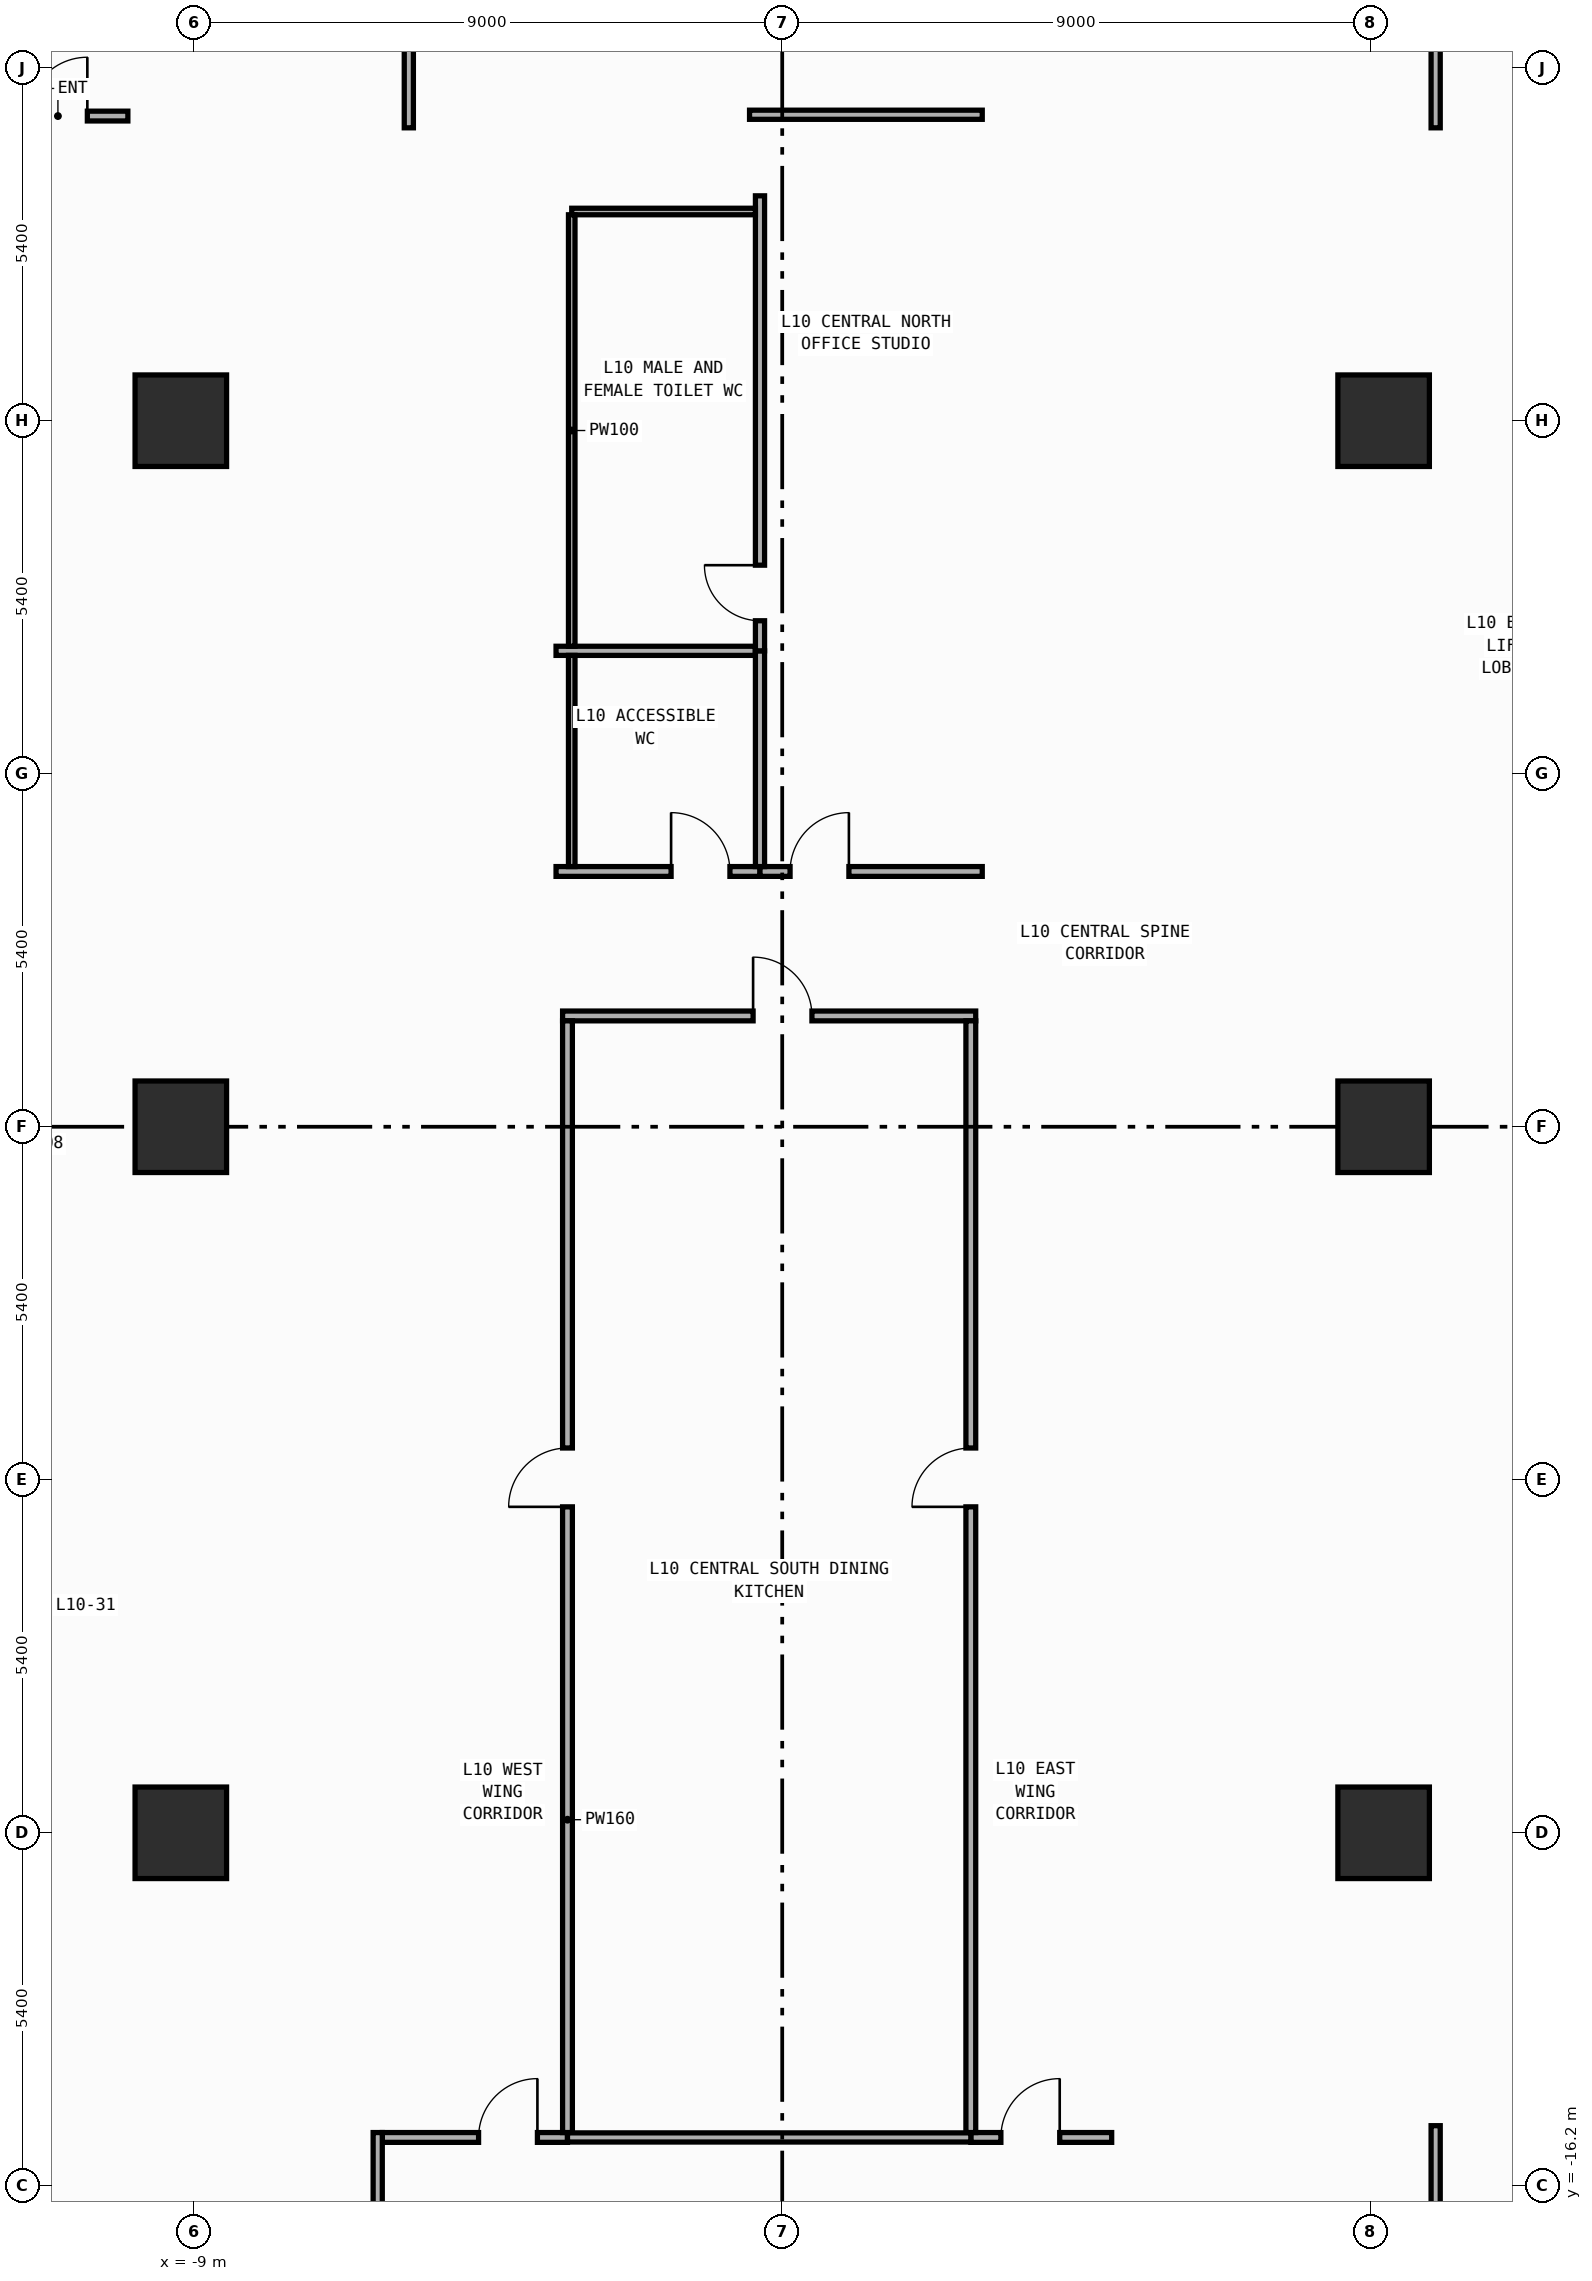
"""IFC4 building model, lengths in metres.
Left out: names, types, materials, properties, quantities, classifications, styles, units other than length and angle.
Written with IfcOpenShell. Run it as: python <this file> out.ifc"""

import sys

from ifc_helpers import new_model, si_unit, direction, frame, frame_2d, origin, origin_2d, place, context, subcontext, project, spatial, rectangle, extrude, element, fill, save


model = new_model("IFC4")
c1 = context("Model", 3, precision=1e-05, world=origin(), true_north=direction((0.0, 1.0)))
c2 = subcontext(c1, "Body", "Model", "MODEL_VIEW")
j1 = project(units=[si_unit("LENGTHUNIT", "METRE"), si_unit("PLANEANGLEUNIT", "RADIAN")], contexts=[c1])
p1 = place(None, origin())
s1 = spatial("IfcSite", under=j1, at=p1, CompositionType="ELEMENT")
p2 = place(p1, origin())
s2 = spatial("IfcBuilding", under=s1, at=p2, CompositionType="ELEMENT")
p3 = place(p2, frame((0.0, 0.0, 42.8)))
s3 = spatial("IfcBuildingStorey", under=s2, at=p3, CompositionType="ELEMENT", Elevation=42.8)
for number, where, z_axis, x_axis in (
    (1, (-9.2, -10.8, 0.0), (0.0, 0.0, 1.0), (1.0, 0.0, 0.0)),
    (2, (-9.2, 0.0, 0.0), (0.0, 0.0, 1.0), (1.0, 0.0, 0.0)),
    (3, (-9.2, 10.8, 0.0), (0.0, 0.0, 1.0), (1.0, 0.0, 0.0)),
    (4, (9.2, -10.8, 0.0), (0.0, 0.0, 1.0), (1.0, 0.0, 0.0)),
    (5, (9.2, 0.0, 0.0), (0.0, 0.0, 1.0), (1.0, 0.0, 0.0)),
    (6, (9.2, 10.8, 0.0), (0.0, 0.0, 1.0), (1.0, 0.0, 0.0)),
):
    element("IfcColumn", number, at=place(p3, frame(where, z_axis=z_axis, x_axis=x_axis)), inside=s3, PredefinedType="COLUMN", context=c2, shape_type="SweptSolid", body=[
        extrude(rectangle(XDim=1.4, YDim=1.4, at=origin_2d()), origin(), (0.0, 0.0, 1.0), 4.2),
    ])
p4 = place(p3, frame((-11.99, 15.46, 0.0), z_axis=(0.0, 0.0, 1.0), x_axis=(1.0, 0.0, 0.0)))
e7 = element("IfcWall", 7, at=p4, inside=s3, PredefinedType="PARTITIONING", context=c2, shape_type="SweptSolid", body=[
    extrude(rectangle(XDim=1.98, YDim=0.15, at=frame_2d((0.99, 0.0))), origin(), (0.0, 0.0, 1.0), 3.94),
])
p5 = place(p4, frame((0.46, 0.0, 0.0)))
e8 = element("IfcOpeningElement", 8, at=p5, cuts=e7, PredefinedType="OPENING", context=c2, shape_type="SweptSolid", body=[
    extrude(rectangle(XDim=0.9, YDim=2.15, at=frame_2d((0.45, 1.075))), frame((0.0, 0.085, 0.0), z_axis=(0.0, -1.0, 0.0), x_axis=(1.0, 0.0, 0.0)), (0.0, 0.0, 1.0), 0.17),
])
p6 = place(p3, frame((-3.46, 3.905, 0.0), z_axis=(0.0, 0.0, 1.0), x_axis=(1.0, 0.0, 0.0)))
e9 = element("IfcWall", 9, at=p6, inside=s3, PredefinedType="PARTITIONING", context=c2, shape_type="SweptSolid", body=[
    extrude(rectangle(XDim=3.12, YDim=0.15, at=frame_2d((1.56, 0.0))), origin(), (0.0, 0.0, 1.0), 3.94),
])
p7 = place(p6, frame((1.76, 0.0, 0.0)))
e10 = element("IfcOpeningElement", 10, at=p7, cuts=e9, PredefinedType="OPENING", context=c2, shape_type="SweptSolid", body=[
    extrude(rectangle(XDim=0.9, YDim=2.15, at=frame_2d((0.45, 1.075))), frame((0.0, 0.085, 0.0), z_axis=(0.0, -1.0, 0.0), x_axis=(1.0, 0.0, 0.0)), (0.0, 0.0, 1.0), 0.17),
])
p8 = place(p3, frame((-0.34, 3.905, 0.0), z_axis=(0.0, 0.0, 1.0), x_axis=(1.0, 0.0, 0.0)))
e11 = element("IfcWall", 11, at=p8, inside=s3, PredefinedType="PARTITIONING", context=c2, shape_type="SweptSolid", body=[
    extrude(rectangle(XDim=3.4, YDim=0.15, at=frame_2d((1.7, 0.0))), origin(), (0.0, 0.0, 1.0), 3.94),
])
p9 = place(p8, frame((0.46, 0.0, 0.0)))
e12 = element("IfcOpeningElement", 12, at=p9, cuts=e11, PredefinedType="OPENING", context=c2, shape_type="SweptSolid", body=[
    extrude(rectangle(XDim=0.9, YDim=2.15, at=frame_2d((0.45, 1.075))), frame((0.0, 0.085, 0.0), z_axis=(0.0, -1.0, 0.0), x_axis=(1.0, 0.0, 0.0)), (0.0, 0.0, 1.0), 0.17),
])
p10 = place(p3, frame((-3.36, 1.695, 0.0), z_axis=(0.0, 0.0, 1.0), x_axis=(1.0, 0.0, 0.0)))
e13 = element("IfcWall", 13, at=p10, inside=s3, PredefinedType="PARTITIONING", context=c2, shape_type="SweptSolid", body=[
    extrude(rectangle(XDim=6.32, YDim=0.15, at=frame_2d((3.16, 0.0))), origin(), (0.0, 0.0, 1.0), 3.94),
])
p11 = place(p10, frame((2.915, 0.0, 0.0)))
e14 = element("IfcOpeningElement", 14, at=p11, cuts=e13, PredefinedType="OPENING", context=c2, shape_type="SweptSolid", body=[
    extrude(rectangle(XDim=0.9, YDim=2.15, at=frame_2d((0.45, 1.075))), frame((0.0, 0.085, 0.0), z_axis=(0.0, -1.0, 0.0), x_axis=(1.0, 0.0, 0.0)), (0.0, 0.0, 1.0), 0.17),
])
p12 = place(p3, frame((-6.118, -15.46, 0.0), z_axis=(0.0, 0.0, 1.0), x_axis=(1.0, 0.0, 0.0)))
e15 = element("IfcWall", 15, at=p12, inside=s3, PredefinedType="PARTITIONING", context=c2, shape_type="SweptSolid", body=[
    extrude(rectangle(XDim=2.833, YDim=0.15, at=frame_2d((1.417, 0.0))), origin(), (0.0, 0.0, 1.0), 3.94),
])
p13 = place(p12, frame((1.473, 0.0, 0.0)))
e16 = element("IfcOpeningElement", 16, at=p13, cuts=e15, PredefinedType="OPENING", context=c2, shape_type="SweptSolid", body=[
    extrude(rectangle(XDim=0.9, YDim=2.15, at=frame_2d((0.45, 1.075))), frame((0.0, 0.085, 0.0), z_axis=(0.0, -1.0, 0.0), x_axis=(1.0, 0.0, 0.0)), (0.0, 0.0, 1.0), 0.17),
])
p14 = place(p3, frame((-3.285, -15.385, 0.0), z_axis=(0.0, 0.0, 1.0), x_axis=(0.0, 1.0, 0.0)))
e17 = element("IfcWall", 17, at=p14, inside=s3, PredefinedType="PARTITIONING", context=c2, shape_type="SweptSolid", body=[
    extrude(rectangle(XDim=17.005, YDim=0.15, at=frame_2d((8.502, 0.0))), origin(), (0.0, 0.0, 1.0), 3.94),
])
p15 = place(p14, frame((9.571, 0.0, 0.0)))
e18 = element("IfcOpeningElement", 18, at=p15, cuts=e17, PredefinedType="OPENING", context=c2, shape_type="SweptSolid", body=[
    extrude(rectangle(XDim=0.9, YDim=2.15, at=frame_2d((0.45, 1.075))), frame((0.0, 0.085, 0.0), z_axis=(0.0, -1.0, 0.0), x_axis=(1.0, 0.0, 0.0)), (0.0, 0.0, 1.0), 0.17),
])
p16 = place(p3, frame((2.885, -15.46, 0.0), z_axis=(0.0, 0.0, 1.0), x_axis=(1.0, 0.0, 0.0)))
e19 = element("IfcWall", 19, at=p16, inside=s3, PredefinedType="PARTITIONING", context=c2, shape_type="SweptSolid", body=[
    extrude(rectangle(XDim=2.155, YDim=0.15, at=frame_2d((1.078, 0.0))), origin(), (0.0, 0.0, 1.0), 3.94),
])
p17 = place(p16, frame((0.46, 0.0, 0.0)))
e20 = element("IfcOpeningElement", 20, at=p17, cuts=e19, PredefinedType="OPENING", context=c2, shape_type="SweptSolid", body=[
    extrude(rectangle(XDim=0.9, YDim=2.15, at=frame_2d((0.45, 1.075))), frame((0.0, 0.085, 0.0), z_axis=(0.0, -1.0, 0.0), x_axis=(1.0, 0.0, 0.0)), (0.0, 0.0, 1.0), 0.17),
])
p18 = place(p3, frame((2.885, -15.385, 0.0), z_axis=(0.0, 0.0, 1.0), x_axis=(0.0, 1.0, 0.0)))
e21 = element("IfcWall", 21, at=p18, inside=s3, PredefinedType="PARTITIONING", context=c2, shape_type="SweptSolid", body=[
    extrude(rectangle(XDim=17.005, YDim=0.15, at=frame_2d((8.502, 0.0))), origin(), (0.0, 0.0, 1.0), 3.94),
])
p19 = place(p18, frame((9.571, 0.0, 0.0)))
e22 = element("IfcOpeningElement", 22, at=p19, cuts=e21, PredefinedType="OPENING", context=c2, shape_type="SweptSolid", body=[
    extrude(rectangle(XDim=0.9, YDim=2.15, at=frame_2d((0.45, 1.075))), frame((0.0, 0.085, 0.0), z_axis=(0.0, -1.0, 0.0), x_axis=(1.0, 0.0, 0.0)), (0.0, 0.0, 1.0), 0.17),
])
p20 = place(p3, frame((-5.712, 15.28, 0.0), z_axis=(0.0, 0.0, 1.0), x_axis=(0.0, 1.0, 0.0)))
e23 = element("IfcWall", 23, at=p20, inside=s3, PredefinedType="PARTITIONING", context=c2, shape_type="SweptSolid", body=[
    extrude(rectangle(XDim=11.575, YDim=0.14, at=frame_2d((5.788, 0.0))), origin(), (0.0, 0.0, 1.0), 3.94),
])
p21 = place(p20, frame((10.265, 0.0, 0.0)))
e24 = element("IfcOpeningElement", 24, at=p21, cuts=e23, PredefinedType="OPENING", context=c2, shape_type="SweptSolid", body=[
    extrude(rectangle(XDim=0.85, YDim=2.1, at=frame_2d((0.425, 1.05))), frame((0.0, 0.08, 0.0), z_axis=(0.0, -1.0, 0.0), x_axis=(1.0, 0.0, 0.0)), (0.0, 0.0, 1.0), 0.16),
])
p22 = place(p3, frame((9.996, 15.28, 0.0), z_axis=(0.0, 0.0, 1.0), x_axis=(0.0, 1.0, 0.0)))
e25 = element("IfcWall", 25, at=p22, inside=s3, PredefinedType="PARTITIONING", context=c2, shape_type="SweptSolid", body=[
    extrude(rectangle(XDim=11.575, YDim=0.14, at=frame_2d((5.788, 0.0))), origin(), (0.0, 0.0, 1.0), 3.94),
])
p23 = place(p3, frame((-0.5, 15.48, 0.0), z_axis=(0.0, 0.0, 1.0), x_axis=(1.0, 0.0, 0.0)))
e26 = element("IfcWall", 26, at=p23, inside=s3, PredefinedType="PARTITIONING", context=c2, shape_type="SweptSolid", body=[
    extrude(rectangle(XDim=3.56, YDim=0.14, at=frame_2d((1.78, 0.0))), origin(), (0.0, 0.0, 1.0), 3.94),
])
p24 = place(p3, frame((-6.188, -26.795, 0.0), z_axis=(0.0, 0.0, 1.0), x_axis=(0.0, 1.0, 0.0)))
e27 = element("IfcWall", 27, at=p24, inside=s3, PredefinedType="PARTITIONING", context=c2, shape_type="SweptSolid", body=[
    extrude(rectangle(XDim=11.41, YDim=0.14, at=frame_2d((5.705, 0.0))), origin(), (0.0, 0.0, 1.0), 3.94),
])
p25 = place(p24, frame((0.46, 0.0, 0.0)))
e28 = element("IfcOpeningElement", 28, at=p25, cuts=e27, PredefinedType="OPENING", context=c2, shape_type="SweptSolid", body=[
    extrude(rectangle(XDim=0.85, YDim=2.1, at=frame_2d((0.425, 1.05))), frame((0.0, 0.08, 0.0), z_axis=(0.0, -1.0, 0.0), x_axis=(1.0, 0.0, 0.0)), (0.0, 0.0, 1.0), 0.16),
])
p26 = place(p3, frame((9.996, -26.716, 0.0), z_axis=(0.0, 0.0, 1.0), x_axis=(0.0, 1.0, 0.0)))
e29 = element("IfcWall", 29, at=p26, inside=s3, PredefinedType="PARTITIONING", context=c2, shape_type="SweptSolid", body=[
    extrude(rectangle(XDim=11.436, YDim=0.14, at=frame_2d((5.718, 0.0))), origin(), (0.0, 0.0, 1.0), 3.94),
])
p27 = place(p26, frame((3.078, 0.0, 0.0)))
e30 = element("IfcOpeningElement", 30, at=p27, cuts=e29, PredefinedType="OPENING", context=c2, shape_type="SweptSolid", body=[
    extrude(rectangle(XDim=0.85, YDim=2.1, at=frame_2d((0.425, 1.05))), frame((0.0, 0.08, 0.0), z_axis=(0.0, -1.0, 0.0), x_axis=(1.0, 0.0, 0.0)), (0.0, 0.0, 1.0), 0.16),
])
p28 = place(p3, frame((-3.285, -15.46, 0.0), z_axis=(0.0, 0.0, 1.0), x_axis=(1.0, 0.0, 0.0)))
e31 = element("IfcWall", 31, at=p28, inside=s3, PredefinedType="PARTITIONING", context=c2, shape_type="SweptSolid", body=[
    extrude(rectangle(XDim=6.17, YDim=0.14, at=frame_2d((3.085, 0.0))), origin(), (0.0, 0.0, 1.0), 3.94),
])
p29 = place(p3, frame((-3.46, 7.28, 0.0), z_axis=(0.0, 0.0, 1.0), x_axis=(1.0, 0.0, 0.0)))
e32 = element("IfcWall", 32, at=p29, inside=s3, PredefinedType="PARTITIONING", context=c2, shape_type="SweptSolid", body=[
    extrude(rectangle(XDim=3.05, YDim=0.14, at=frame_2d((1.525, 0.0))), origin(), (0.0, 0.0, 1.0), 3.94),
])
p30 = place(p3, frame((-0.34, 3.98, 0.0), z_axis=(0.0, 0.0, 1.0), x_axis=(0.0, 1.0, 0.0)))
e33 = element("IfcWall", 33, at=p30, inside=s3, PredefinedType="PARTITIONING", context=c2, shape_type="SweptSolid", body=[
    extrude(rectangle(XDim=3.3, YDim=0.14, at=frame_2d((1.65, 0.0))), origin(), (0.0, 0.0, 1.0), 3.94),
])
p31 = place(p3, frame((-0.34, 7.28, 0.0), z_axis=(0.0, 0.0, 1.0), x_axis=(0.0, 1.0, 0.0)))
e34 = element("IfcWall", 34, at=p31, inside=s3, PredefinedType="PARTITIONING", context=c2, shape_type="SweptSolid", body=[
    extrude(rectangle(XDim=6.96, YDim=0.14, at=frame_2d((3.48, 0.0))), origin(), (0.0, 0.0, 1.0), 3.94),
])
p32 = place(p31, frame((0.46, 0.0, 0.0)))
e35 = element("IfcOpeningElement", 35, at=p32, cuts=e34, PredefinedType="OPENING", context=c2, shape_type="SweptSolid", body=[
    extrude(rectangle(XDim=0.85, YDim=2.1, at=frame_2d((0.425, 1.05))), frame((0.0, 0.08, 0.0), z_axis=(0.0, -1.0, 0.0), x_axis=(1.0, 0.0, 0.0)), (0.0, 0.0, 1.0), 0.16),
])
p33 = place(p3, frame((-3.22, 3.98, 0.0), z_axis=(0.0, 0.0, 1.0), x_axis=(0.0, 1.0, 0.0)))
e36 = element("IfcWall", 36, at=p33, inside=s3, PredefinedType="PARTITIONING", context=c2, shape_type="SweptSolid", body=[
    extrude(rectangle(XDim=3.23, YDim=0.1, at=frame_2d((1.615, 0.0))), origin(), (0.0, 0.0, 1.0), 3.94),
])
p34 = place(p3, frame((-3.22, 14.0, 0.0), z_axis=(0.0, 0.0, 1.0), x_axis=(1.0, 0.0, 0.0)))
e37 = element("IfcWall", 37, at=p34, inside=s3, PredefinedType="PARTITIONING", context=c2, shape_type="SweptSolid", body=[
    extrude(rectangle(XDim=2.81, YDim=0.1, at=frame_2d((1.405, 0.0))), origin(), (0.0, 0.0, 1.0), 3.94),
])
p35 = place(p3, frame((-3.22, 7.35, 0.0), z_axis=(0.0, 0.0, 1.0), x_axis=(0.0, 1.0, 0.0)))
e38 = element("IfcWall", 38, at=p35, inside=s3, PredefinedType="PARTITIONING", context=c2, shape_type="SweptSolid", body=[
    extrude(rectangle(XDim=6.6, YDim=0.1, at=frame_2d((3.3, 0.0))), origin(), (0.0, 0.0, 1.0), 3.94),
])
p36 = place(p5, origin())
e39 = element("IfcDoor", 39, at=p36, inside=s3, OperationType="SINGLE_SWING_RIGHT", PredefinedType="DOOR", context=c2, shape_type="SweptSolid", body=[
    extrude(rectangle(XDim=0.9, YDim=2.15, at=frame_2d((0.45, 1.075))), frame((0.0, 0.025, 0.0), z_axis=(0.0, -1.0, 0.0), x_axis=(1.0, 0.0, 0.0)), (0.0, 0.0, 1.0), 0.05),
])
fill(e8, e39)
p37 = place(p7, origin())
e40 = element("IfcDoor", 40, at=p37, inside=s3, OperationType="SINGLE_SWING_LEFT", PredefinedType="DOOR", context=c2, shape_type="SweptSolid", body=[
    extrude(rectangle(XDim=0.9, YDim=2.15, at=frame_2d((0.45, 1.075))), frame((0.0, 0.025, 0.0), z_axis=(0.0, -1.0, 0.0), x_axis=(1.0, 0.0, 0.0)), (0.0, 0.0, 1.0), 0.05),
])
fill(e10, e40)
p38 = place(p9, origin())
e41 = element("IfcDoor", 41, at=p38, inside=s3, OperationType="SINGLE_SWING_RIGHT", PredefinedType="DOOR", context=c2, shape_type="SweptSolid", body=[
    extrude(rectangle(XDim=0.9, YDim=2.15, at=frame_2d((0.45, 1.075))), frame((0.0, 0.025, 0.0), z_axis=(0.0, -1.0, 0.0), x_axis=(1.0, 0.0, 0.0)), (0.0, 0.0, 1.0), 0.05),
])
fill(e12, e41)
p39 = place(p11, origin())
e42 = element("IfcDoor", 42, at=p39, inside=s3, OperationType="SINGLE_SWING_LEFT", PredefinedType="DOOR", context=c2, shape_type="SweptSolid", body=[
    extrude(rectangle(XDim=0.9, YDim=2.15, at=frame_2d((0.45, 1.075))), frame((0.0, 0.025, 0.0), z_axis=(0.0, -1.0, 0.0), x_axis=(1.0, 0.0, 0.0)), (0.0, 0.0, 1.0), 0.05),
])
fill(e14, e42)
p40 = place(p13, origin())
e43 = element("IfcDoor", 43, at=p40, inside=s3, OperationType="SINGLE_SWING_RIGHT", PredefinedType="DOOR", context=c2, shape_type="SweptSolid", body=[
    extrude(rectangle(XDim=0.9, YDim=2.15, at=frame_2d((0.45, 1.075))), frame((0.0, 0.025, 0.0), z_axis=(0.0, -1.0, 0.0), x_axis=(1.0, 0.0, 0.0)), (0.0, 0.0, 1.0), 0.05),
])
fill(e16, e43)
p41 = place(p15, origin())
e44 = element("IfcDoor", 44, at=p41, inside=s3, OperationType="SINGLE_SWING_LEFT", PredefinedType="DOOR", context=c2, shape_type="SweptSolid", body=[
    extrude(rectangle(XDim=0.9, YDim=2.15, at=frame_2d((0.45, 1.075))), frame((0.0, 0.025, 0.0), z_axis=(0.0, -1.0, 0.0), x_axis=(1.0, 0.0, 0.0)), (0.0, 0.0, 1.0), 0.05),
])
fill(e18, e44)
p42 = place(p17, origin())
e45 = element("IfcDoor", 45, at=p42, inside=s3, OperationType="SINGLE_SWING_RIGHT", PredefinedType="DOOR", context=c2, shape_type="SweptSolid", body=[
    extrude(rectangle(XDim=0.9, YDim=2.15, at=frame_2d((0.45, 1.075))), frame((0.0, 0.025, 0.0), z_axis=(0.0, -1.0, 0.0), x_axis=(1.0, 0.0, 0.0)), (0.0, 0.0, 1.0), 0.05),
])
fill(e20, e45)
p43 = place(p19, origin())
e46 = element("IfcDoor", 46, at=p43, inside=s3, OperationType="SINGLE_SWING_LEFT", PredefinedType="DOOR", context=c2, shape_type="SweptSolid", body=[
    extrude(rectangle(XDim=0.9, YDim=2.15, at=frame_2d((0.45, 1.075))), frame((0.0, 0.025, 0.0), z_axis=(0.0, -1.0, 0.0), x_axis=(1.0, 0.0, 0.0)), (0.0, 0.0, 1.0), 0.05),
])
fill(e22, e46)
p44 = place(p32, origin())
e47 = element("IfcDoor", 47, at=p44, inside=s3, OperationType="SINGLE_SWING_RIGHT", PredefinedType="DOOR", context=c2, shape_type="SweptSolid", body=[
    extrude(rectangle(XDim=0.85, YDim=2.1, at=frame_2d((0.425, 1.05))), frame((0.0, 0.025, 0.0), z_axis=(0.0, -1.0, 0.0), x_axis=(1.0, 0.0, 0.0)), (0.0, 0.0, 1.0), 0.05),
])
fill(e35, e47)
save(model, sys.argv[1])
